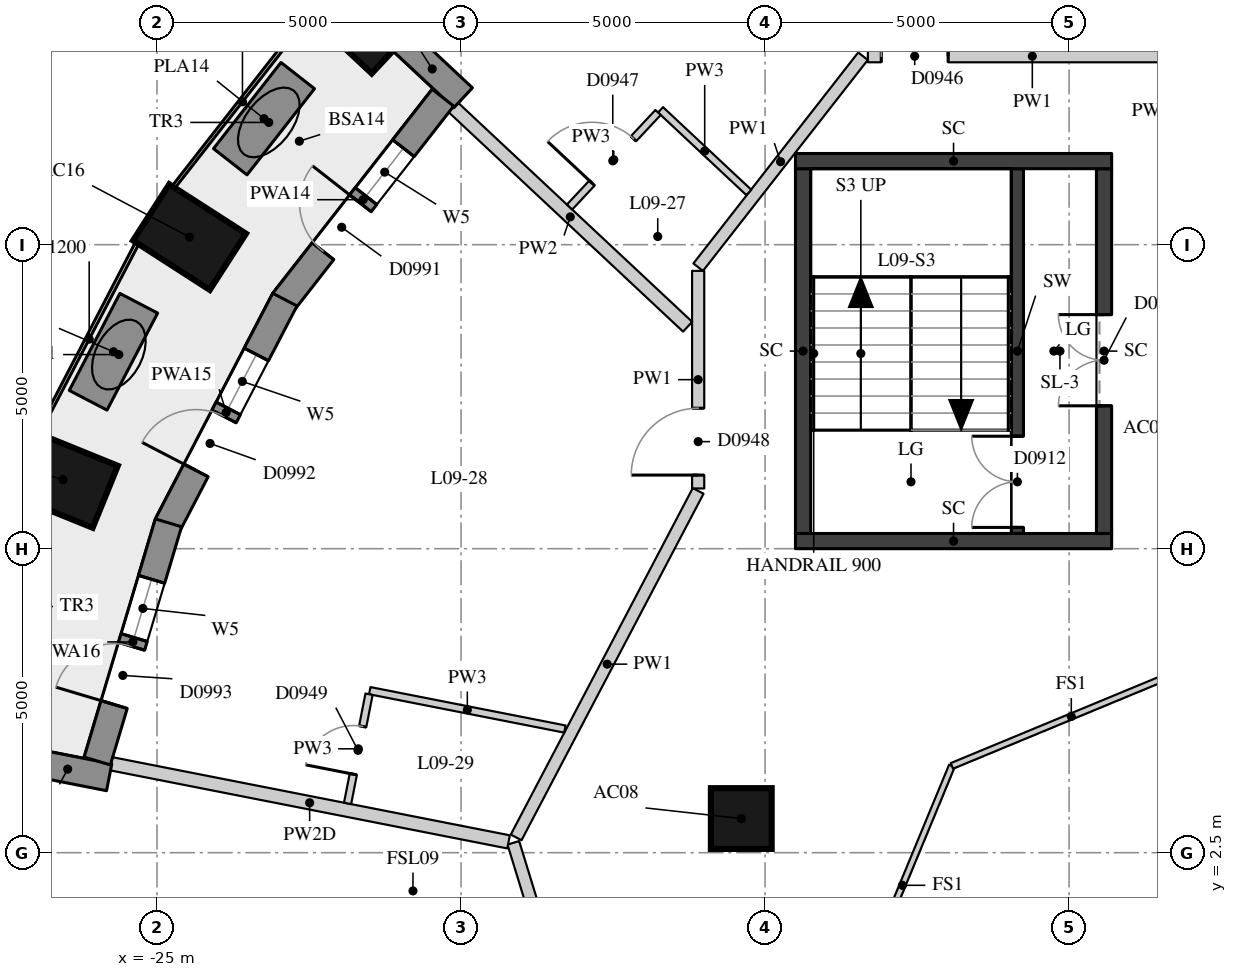
"""IFC4 building model, lengths in metres.
Left out: names, types, materials, properties, quantities, classifications, styles, units other than length and angle.
Written with IfcOpenShell. Run it as: python <this file> out.ifc"""

import sys

from ifc_helpers import new_model, si_unit, direction, frame, frame_2d, origin, origin_2d, place, context, subcontext, project, spatial, rectangle, extrude, element, fill, save


model = new_model("IFC4")
c1 = context("Model", 3, precision=1e-05, world=origin(), true_north=direction((0.0, 1.0)))
c2 = subcontext(c1, "Body", "Model", "MODEL_VIEW")
j1 = project(units=[si_unit("LENGTHUNIT", "METRE"), si_unit("PLANEANGLEUNIT", "RADIAN")], contexts=[c1])
p1 = place(None, origin())
s1 = spatial("IfcSite", under=j1, at=p1, CompositionType="ELEMENT")
p2 = place(p1, origin())
s2 = spatial("IfcBuilding", under=s1, at=p2, CompositionType="ELEMENT")
p3 = place(p2, frame((0.0, 0.0, 38.2)))
s3 = spatial("IfcBuildingStorey", under=s2, at=p3, CompositionType="ELEMENT", Elevation=38.2)
for number, where, z_axis, x_axis in (
    (1, (-21.641, 16.23, 0.0), (0.0, 0.0, 1.0), (-0.73, 0.683, 0.0)),
    (2, (-24.465, 12.625, 0.0), (0.0, 0.0, 1.0), (-0.841, 0.541, 0.0)),
    (3, (-26.546, 8.636, 0.0), (0.0, 0.0, 1.0), (-0.927, 0.376, 0.0)),
):
    element("IfcColumn", number, at=place(p3, frame(where, z_axis=z_axis, x_axis=x_axis)), inside=s3, PredefinedType="COLUMN", context=c2, shape_type="SweptSolid", body=[
        extrude(rectangle(XDim=1.5, YDim=1.1, at=origin_2d()), origin(), (0.0, 0.0, 1.0), 3.3),
    ])
p4 = place(p3, frame((-15.391, 3.062, 0.0), z_axis=(0.0, 0.0, 1.0), x_axis=(1.0, 0.0, 0.0)))
e4 = element("IfcColumn", 4, at=p4, inside=s3, PredefinedType="COLUMN", context=c2, shape_type="SweptSolid", body=[
    extrude(rectangle(XDim=1.0, YDim=1.0, at=origin_2d()), origin(), (0.0, 0.0, 1.0), 3.3),
])
p5 = place(p3, frame((-20.982, 15.866, 0.0), z_axis=(0.0, 0.0, 1.0), x_axis=(0.730062381614, -0.683380508174, 0.0)))
e5 = element("IfcWall", 5, at=p5, inside=s3, PredefinedType="SOLIDWALL", context=c2, shape_type="SweptSolid", body=[
    extrude(rectangle(XDim=1.391, YDim=0.45, at=frame_2d((0.696, 0.0))), origin(), (0.0, 0.0, 1.0), 3.02),
])
p6 = place(p3, frame((-27.151, 4.009, 0.0), z_axis=(0.0, 0.0, 1.0), x_axis=(0.981197182729, -0.1930080014, 0.0)))
e6 = element("IfcWall", 6, at=p6, inside=s3, PredefinedType="SOLIDWALL", context=c2, shape_type="SweptSolid", body=[
    extrude(rectangle(XDim=1.39, YDim=0.45, at=frame_2d((0.695, 0.0))), origin(), (0.0, 0.0, 1.0), 2.47),
])
p7 = place(p3, frame((-20.298, 14.918, 0.0), z_axis=(0.0, 0.0, 1.0), x_axis=(-0.615578403957, -0.788075649022, 0.0)))
e7 = element("IfcWall", 7, at=p7, inside=s3, PredefinedType="SOLIDWALL", context=c2, shape_type="SweptSolid", body=[
    extrude(rectangle(XDim=4.259, YDim=0.45, at=frame_2d((2.129, 0.0))), origin(), (0.0, 0.0, 1.0), 3.02),
])
p8 = place(p7, frame((1.054, 0.0, 0.4)))
e8 = element("IfcOpeningElement", 8, at=p8, cuts=e7, PredefinedType="OPENING", context=c2, shape_type="SweptSolid", body=[
    extrude(rectangle(XDim=1.0, YDim=1.75, at=frame_2d((0.5, 0.875))), frame((0.0, 0.235, 0.0), z_axis=(0.0, -1.0, 0.0), x_axis=(1.0, 0.0, 0.0)), (0.0, 0.0, 1.0), 0.47),
])
p9 = place(p7, frame((2.204, 0.0, 0.0)))
e9 = element("IfcOpeningElement", 9, at=p9, cuts=e7, PredefinedType="OPENING", context=c2, shape_type="SweptSolid", body=[
    extrude(rectangle(XDim=1.0, YDim=2.15, at=frame_2d((0.5, 1.075))), frame((0.0, 0.235, 0.0), z_axis=(0.0, -1.0, 0.0), x_axis=(1.0, 0.0, 0.0)), (0.0, 0.0, 1.0), 0.47),
])
p10 = place(p3, frame((-22.897, 11.597, 0.0), z_axis=(0.0, 0.0, 1.0), x_axis=(-0.461514453451, -0.887132689769, 0.0)))
e10 = element("IfcWall", 10, at=p10, inside=s3, PredefinedType="SOLIDWALL", context=c2, shape_type="SweptSolid", body=[
    extrude(rectangle(XDim=4.183, YDim=0.45, at=frame_2d((2.091, 0.0))), origin(), (0.0, 0.0, 1.0), 3.02),
])
p11 = place(p10, frame((1.016, 0.0, 0.4)))
e11 = element("IfcOpeningElement", 11, at=p11, cuts=e10, PredefinedType="OPENING", context=c2, shape_type="SweptSolid", body=[
    extrude(rectangle(XDim=1.0, YDim=1.75, at=frame_2d((0.5, 0.875))), frame((0.0, 0.235, 0.0), z_axis=(0.0, -1.0, 0.0), x_axis=(1.0, 0.0, 0.0)), (0.0, 0.0, 1.0), 0.47),
])
p12 = place(p10, frame((2.167, 0.0, 0.0)))
e12 = element("IfcOpeningElement", 12, at=p12, cuts=e10, PredefinedType="OPENING", context=c2, shape_type="SweptSolid", body=[
    extrude(rectangle(XDim=1.0, YDim=2.15, at=frame_2d((0.5, 1.075))), frame((0.0, 0.235, 0.0), z_axis=(0.0, -1.0, 0.0), x_axis=(1.0, 0.0, 0.0)), (0.0, 0.0, 1.0), 0.47),
])
p13 = place(p3, frame((-24.812, 7.925, 0.0), z_axis=(0.0, 0.0, 1.0), x_axis=(-0.286389028326, -0.95811341941, 0.0)))
e13 = element("IfcWall", 13, at=p13, inside=s3, PredefinedType="SOLIDWALL", context=c2, shape_type="SweptSolid", body=[
    extrude(rectangle(XDim=4.088, YDim=0.45, at=frame_2d((2.044, 0.0))), origin(), (0.0, 0.0, 1.0), 3.02),
])
p14 = place(p13, frame((0.969, 0.0, 0.4)))
e14 = element("IfcOpeningElement", 14, at=p14, cuts=e13, PredefinedType="OPENING", context=c2, shape_type="SweptSolid", body=[
    extrude(rectangle(XDim=1.0, YDim=1.75, at=frame_2d((0.5, 0.875))), frame((0.0, 0.235, 0.0), z_axis=(0.0, -1.0, 0.0), x_axis=(1.0, 0.0, 0.0)), (0.0, 0.0, 1.0), 0.47),
])
p15 = place(p13, frame((2.119, 0.0, 0.0)))
e15 = element("IfcOpeningElement", 15, at=p15, cuts=e13, PredefinedType="OPENING", context=c2, shape_type="SweptSolid", body=[
    extrude(rectangle(XDim=1.0, YDim=2.15, at=frame_2d((0.5, 1.075))), frame((0.0, 0.235, 0.0), z_axis=(0.0, -1.0, 0.0), x_axis=(1.0, 0.0, 0.0)), (0.0, 0.0, 1.0), 0.47),
])
p16 = place(p3, frame((-22.686, 15.281, 0.0), z_axis=(0.0, 0.0, 1.0), x_axis=(-0.616622746332, -0.787258781282, 0.0)))
e16 = element("IfcWall", 16, at=p16, inside=s3, PredefinedType="USERDEFINED", context=c2, shape_type="SweptSolid", body=[
    extrude(rectangle(XDim=1.8, YDim=0.7, at=frame_2d((0.9, 0.0))), origin(), (0.0, 0.0, 1.0), 0.75),
])
p17 = place(p3, frame((-25.3, 11.537, 0.0), z_axis=(0.0, 0.0, 1.0), x_axis=(-0.462501112253, -0.886618701114, 0.0)))
e17 = element("IfcWall", 17, at=p17, inside=s3, PredefinedType="USERDEFINED", context=c2, shape_type="SweptSolid", body=[
    extrude(rectangle(XDim=1.8, YDim=0.7, at=frame_2d((0.9, 0.0))), origin(), (0.0, 0.0, 1.0), 0.75),
])
p18 = place(p3, frame((-10.85, 7.75, 0.0), z_axis=(0.0, 0.0, 1.0), x_axis=(0.0, 1.0, 0.0)))
e18 = element("IfcWall", 18, at=p18, inside=s3, PredefinedType="SHEAR", context=c2, shape_type="SweptSolid", body=[
    extrude(rectangle(XDim=6.0, YDim=0.2, at=frame_2d((3.0, 0.0))), origin(), (0.0, 0.0, 1.0), 3.02),
])
p19 = place(p18, frame((0.1, 0.0, 0.0)))
e19 = element("IfcOpeningElement", 19, at=p19, cuts=e18, PredefinedType="OPENING", context=c2, shape_type="SweptSolid", body=[
    extrude(rectangle(XDim=1.5, YDim=2.1, at=frame_2d((0.75, 1.05))), frame((0.0, 0.11, 0.0), z_axis=(0.0, -1.0, 0.0), x_axis=(1.0, 0.0, 0.0)), (0.0, 0.0, 1.0), 0.22),
])
p20 = place(p3, frame((-14.375, 7.75, -0.28), z_axis=(0.0, 0.0, 1.0), x_axis=(0.0, 1.0, 0.0)))
e20 = element("IfcWall", 20, at=p20, inside=s3, PredefinedType="SHEAR", context=c2, shape_type="SweptSolid", body=[
    extrude(rectangle(XDim=6.0, YDim=0.25, at=frame_2d((3.0, 0.0))), origin(), (0.0, 0.0, 1.0), 3.3),
])
p21 = place(p3, frame((-9.425, 7.75, -0.28), z_axis=(0.0, 0.0, 1.0), x_axis=(0.0, 1.0, 0.0)))
e21 = element("IfcWall", 21, at=p21, inside=s3, PredefinedType="SHEAR", context=c2, shape_type="SweptSolid", body=[
    extrude(rectangle(XDim=6.0, YDim=0.25, at=frame_2d((3.0, 0.0))), origin(), (0.0, 0.0, 1.0), 3.3),
])
p22 = place(p21, frame((2.1, 0.0, 0.28)))
e22 = element("IfcOpeningElement", 22, at=p22, cuts=e21, PredefinedType="OPENING", context=c2, shape_type="SweptSolid", body=[
    extrude(rectangle(XDim=1.5, YDim=2.1, at=frame_2d((0.75, 1.05))), frame((0.0, 0.135, 0.0), z_axis=(0.0, -1.0, 0.0), x_axis=(1.0, 0.0, 0.0)), (0.0, 0.0, 1.0), 0.27),
])
for number, where, z_axis, x_axis in (
    (23, (-14.5, 13.875, -0.28), (0.0, 0.0, 1.0), (1.0, 0.0, 0.0)),
    (24, (-14.5, 7.625, -0.28), (0.0, 0.0, 1.0), (1.0, 0.0, 0.0)),
):
    element("IfcWall", number, at=place(p3, frame(where, z_axis=z_axis, x_axis=x_axis)), inside=s3, PredefinedType="SHEAR", context=c2, shape_type="SweptSolid", body=[
        extrude(rectangle(XDim=5.2, YDim=0.25, at=frame_2d((2.6, 0.0))), origin(), (0.0, 0.0, 1.0), 3.3),
    ])
p23 = place(p3, frame((-16.1, 12.13, 0.0), z_axis=(0.0, 0.0, 1.0), x_axis=(0.615593476668, 0.788063875256, 0.0)))
e25 = element("IfcWall", 25, at=p23, inside=s3, PredefinedType="PARTITIONING", context=c2, shape_type="SweptSolid", body=[
    extrude(rectangle(XDim=4.404, YDim=0.2, at=frame_2d((2.202, 0.0))), origin(), (0.0, 0.0, 1.0), 3.02),
])
p24 = place(p3, frame((-13.309, 15.6, 0.0), z_axis=(0.0, 0.0, 1.0), x_axis=(1.0, 0.0, 0.0)))
e26 = element("IfcWall", 26, at=p24, inside=s3, PredefinedType="PARTITIONING", context=c2, shape_type="SweptSolid", body=[
    extrude(rectangle(XDim=5.409, YDim=0.2, at=frame_2d((2.705, 0.0))), origin(), (0.0, 0.0, 1.0), 3.02),
])
p25 = place(p24, frame((0.22, 0.0, 0.0)))
e27 = element("IfcOpeningElement", 27, at=p25, cuts=e26, PredefinedType="OPENING", context=c2, shape_type="SweptSolid", body=[
    extrude(rectangle(XDim=1.1, YDim=2.1, at=frame_2d((0.55, 1.05))), frame((0.0, 0.11, 0.0), z_axis=(0.0, -1.0, 0.0), x_axis=(1.0, 0.0, 0.0)), (0.0, 0.0, 1.0), 0.22),
])
p26 = place(p3, frame((-16.112, -7.203, 0.0), z_axis=(0.0, 0.0, 1.0), x_axis=(-0.293439067289, 0.95597777892, 0.0)))
e28 = element("IfcWall", 28, at=p26, inside=s3, PredefinedType="PARTITIONING", context=c2, shape_type="SweptSolid", body=[
    extrude(rectangle(XDim=10.319, YDim=0.2, at=frame_2d((5.16, 0.0))), origin(), (0.0, 0.0, 1.0), 3.02),
])
p27 = place(p26, frame((7.444, 0.0, 0.0)))
e29 = element("IfcOpeningElement", 29, at=p27, cuts=e28, PredefinedType="OPENING", context=c2, shape_type="SweptSolid", body=[
    extrude(rectangle(XDim=1.1, YDim=2.1, at=frame_2d((0.55, 1.05))), frame((0.0, 0.11, 0.0), z_axis=(0.0, -1.0, 0.0), x_axis=(1.0, 0.0, 0.0)), (0.0, 0.0, 1.0), 0.22),
])
p28 = place(p26, frame((2.081, 0.0, 0.0)))
e30 = element("IfcOpeningElement", 30, at=p28, cuts=e28, PredefinedType="OPENING", context=c2, shape_type="SweptSolid", body=[
    extrude(rectangle(XDim=0.9, YDim=2.1, at=frame_2d((0.45, 1.05))), frame((0.0, 0.11, 0.0), z_axis=(0.0, -1.0, 0.0), x_axis=(1.0, 0.0, 0.0)), (0.0, 0.0, 1.0), 0.22),
])
p29 = place(p3, frame((-19.094, 2.751, 0.0), z_axis=(0.0, 0.0, 1.0), x_axis=(0.464994434802, 0.88531360297, 0.0)))
e31 = element("IfcWall", 31, at=p29, inside=s3, PredefinedType="PARTITIONING", context=c2, shape_type="SweptSolid", body=[
    extrude(rectangle(XDim=6.438, YDim=0.2, at=frame_2d((3.219, 0.0))), origin(), (0.0, 0.0, 1.0), 3.02),
])
p30 = place(p3, frame((-16.1, 8.491, 0.0), z_axis=(0.0, 0.0, 1.0), x_axis=(0.0, 1.0, 0.0)))
e32 = element("IfcWall", 32, at=p30, inside=s3, PredefinedType="PARTITIONING", context=c2, shape_type="SweptSolid", body=[
    extrude(rectangle(XDim=3.579, YDim=0.2, at=frame_2d((1.79, 0.0))), origin(), (0.0, 0.0, 1.0), 3.02),
])
p31 = place(p30, frame((0.22, 0.0, 0.0)))
e33 = element("IfcOpeningElement", 33, at=p31, cuts=e32, PredefinedType="OPENING", context=c2, shape_type="SweptSolid", body=[
    extrude(rectangle(XDim=1.1, YDim=2.1, at=frame_2d((0.55, 1.05))), frame((0.0, 0.11, 0.0), z_axis=(0.0, -1.0, 0.0), x_axis=(1.0, 0.0, 0.0)), (0.0, 0.0, 1.0), 0.22),
])
p32 = place(p3, frame((-20.133, 14.764, 0.0), z_axis=(0.0, 0.0, 1.0), x_axis=(0.730065516357, -0.68337715928, 0.0)))
e34 = element("IfcWall", 34, at=p32, inside=s3, PredefinedType="PARTITIONING", context=c2, shape_type="SweptSolid", body=[
    extrude(rectangle(XDim=5.287, YDim=0.22, at=frame_2d((2.643, 0.0))), origin(), (0.0, 0.0, 1.0), 3.02),
])
p33 = place(p3, frame((-25.761, 3.964, 0.0), z_axis=(0.0, 0.0, 1.0), x_axis=(0.981216162043, -0.192911490963, 0.0)))
e35 = element("IfcWall", 35, at=p33, inside=s3, PredefinedType="PARTITIONING", context=c2, shape_type="SweptSolid", body=[
    extrude(rectangle(XDim=6.668, YDim=0.22, at=frame_2d((3.334, 0.0))), origin(), (0.0, 0.0, 1.0), 2.47),
])
p34 = place(p3, frame((-15.267, 13.359, 0.0), z_axis=(0.0, 0.0, 1.0), x_axis=(-0.730103481834, 0.683336597742, 0.0)))
e36 = element("IfcWall", 36, at=p34, inside=s3, PredefinedType="PARTITIONING", context=c2, shape_type="SweptSolid", body=[
    extrude(rectangle(XDim=1.989, YDim=0.12, at=frame_2d((0.995, 0.0))), origin(), (0.0, 0.0, 1.0), 3.02),
])
p35 = place(p3, frame((-18.292, 4.534, 0.0), z_axis=(0.0, 0.0, 1.0), x_axis=(-0.981198627208, 0.193000657942, 0.0)))
e37 = element("IfcWall", 37, at=p35, inside=s3, PredefinedType="PARTITIONING", context=c2, shape_type="SweptSolid", body=[
    extrude(rectangle(XDim=3.271, YDim=0.12, at=frame_2d((1.636, 0.0))), origin(), (0.0, 0.0, 1.0), 3.02),
])
p36 = place(p3, frame((-16.76, 14.674, 0.0), z_axis=(0.0, 0.0, 1.0), x_axis=(-0.683334594436, -0.730105356813, 0.0)))
e38 = element("IfcWall", 38, at=p36, inside=s3, PredefinedType="PARTITIONING", context=c2, shape_type="SweptSolid", body=[
    extrude(rectangle(XDim=2.13, YDim=0.12, at=frame_2d((1.065, 0.0))), origin(), (0.0, 0.0, 1.0), 3.02),
])
p37 = place(p36, frame((0.59, 0.0, 0.0)))
e39 = element("IfcOpeningElement", 39, at=p37, cuts=e38, PredefinedType="OPENING", context=c2, shape_type="SweptSolid", body=[
    extrude(rectangle(XDim=1.0, YDim=2.1, at=frame_2d((0.5, 1.05))), frame((0.0, 0.07, 0.0), z_axis=(0.0, -1.0, 0.0), x_axis=(1.0, 0.0, 0.0)), (0.0, 0.0, 1.0), 0.14),
])
p38 = place(p3, frame((-21.513, 5.106, 0.0), z_axis=(0.0, 0.0, 1.0), x_axis=(-0.19288291118, -0.981221780524, 0.0)))
e40 = element("IfcWall", 40, at=p38, inside=s3, PredefinedType="PARTITIONING", context=c2, shape_type="SweptSolid", body=[
    extrude(rectangle(XDim=1.83, YDim=0.12, at=frame_2d((0.915, 0.0))), origin(), (0.0, 0.0, 1.0), 3.02),
])
p39 = place(p38, frame((0.54, 0.0, 0.0)))
e41 = element("IfcOpeningElement", 41, at=p39, cuts=e40, PredefinedType="OPENING", context=c2, shape_type="SweptSolid", body=[
    extrude(rectangle(XDim=0.8, YDim=2.1, at=frame_2d((0.4, 1.05))), frame((0.0, 0.07, 0.0), z_axis=(0.0, -1.0, 0.0), x_axis=(1.0, 0.0, 0.0)), (0.0, 0.0, 1.0), 0.14),
])
for number, where, z_axis, x_axis in (
    (42, (-13.554, 0.0, 0.0), (0.0, 0.0, 1.0), (0.383, 0.924, 0.0)),
    (43, (-11.927, 3.927, 0.0), (0.0, 0.0, 1.0), (0.924, 0.383, 0.0)),
):
    element("IfcWall", number, at=place(p3, frame(where, z_axis=z_axis, x_axis=x_axis)), inside=s3, PredefinedType="PARTITIONING", context=c2, shape_type="SweptSolid", body=[
        extrude(rectangle(XDim=4.251, YDim=0.1, at=frame_2d((2.125, 0.0))), origin(), (0.0, 0.0, 1.0), 3.02),
    ])
p40 = place(p8, origin())
e44 = element("IfcWindow", 44, at=p40, inside=s3, PartitioningType="SINGLE_PANEL", PredefinedType="WINDOW", context=c2, shape_type="SweptSolid", body=[
    extrude(rectangle(XDim=1.0, YDim=1.75, at=frame_2d((0.5, 0.875))), frame((0.0, 0.035, 0.0), z_axis=(0.0, -1.0, 0.0), x_axis=(1.0, 0.0, 0.0)), (0.0, 0.0, 1.0), 0.06),
])
fill(e8, e44)
p41 = place(p9, frame((1.0, 0.0, 0.0), z_axis=(0.0, 0.0, 1.0), x_axis=(-1.0, 0.0, 0.0)))
e45 = element("IfcDoor", 45, at=p41, inside=s3, OperationType="SINGLE_SWING_RIGHT", PredefinedType="DOOR", context=c2, shape_type="SweptSolid", body=[
    extrude(rectangle(XDim=1.0, YDim=2.15, at=frame_2d((0.5, 1.075))), frame((0.0, 0.075, 0.0), z_axis=(0.0, -1.0, 0.0), x_axis=(1.0, 0.0, 0.0)), (0.0, 0.0, 1.0), 0.05),
])
fill(e9, e45)
p42 = place(p11, origin())
e46 = element("IfcWindow", 46, at=p42, inside=s3, PartitioningType="SINGLE_PANEL", PredefinedType="WINDOW", context=c2, shape_type="SweptSolid", body=[
    extrude(rectangle(XDim=1.0, YDim=1.75, at=frame_2d((0.5, 0.875))), frame((0.0, 0.035, 0.0), z_axis=(0.0, -1.0, 0.0), x_axis=(1.0, 0.0, 0.0)), (0.0, 0.0, 1.0), 0.06),
])
fill(e11, e46)
p43 = place(p12, frame((1.0, 0.0, 0.0), z_axis=(0.0, 0.0, 1.0), x_axis=(-1.0, 0.0, 0.0)))
e47 = element("IfcDoor", 47, at=p43, inside=s3, OperationType="SINGLE_SWING_LEFT", PredefinedType="DOOR", context=c2, shape_type="SweptSolid", body=[
    extrude(rectangle(XDim=1.0, YDim=2.15, at=frame_2d((0.5, 1.075))), frame((0.0, 0.075, 0.0), z_axis=(0.0, -1.0, 0.0), x_axis=(1.0, 0.0, 0.0)), (0.0, 0.0, 1.0), 0.05),
])
fill(e12, e47)
p44 = place(p14, origin())
e48 = element("IfcWindow", 48, at=p44, inside=s3, PartitioningType="SINGLE_PANEL", PredefinedType="WINDOW", context=c2, shape_type="SweptSolid", body=[
    extrude(rectangle(XDim=1.0, YDim=1.75, at=frame_2d((0.5, 0.875))), frame((0.0, 0.035, 0.0), z_axis=(0.0, -1.0, 0.0), x_axis=(1.0, 0.0, 0.0)), (0.0, 0.0, 1.0), 0.06),
])
fill(e14, e48)
p45 = place(p15, frame((1.0, 0.0, 0.0), z_axis=(0.0, 0.0, 1.0), x_axis=(-1.0, 0.0, 0.0)))
e49 = element("IfcDoor", 49, at=p45, inside=s3, OperationType="SINGLE_SWING_LEFT", PredefinedType="DOOR", context=c2, shape_type="SweptSolid", body=[
    extrude(rectangle(XDim=1.0, YDim=2.15, at=frame_2d((0.5, 1.075))), frame((0.0, 0.075, 0.0), z_axis=(0.0, -1.0, 0.0), x_axis=(1.0, 0.0, 0.0)), (0.0, 0.0, 1.0), 0.05),
])
fill(e15, e49)
p46 = place(p19, origin())
e50 = element("IfcDoor", 50, at=p46, inside=s3, OperationType="DOUBLE_DOOR_SINGLE_SWING", PredefinedType="DOOR", context=c2, shape_type="SweptSolid", body=[
    extrude(rectangle(XDim=1.5, YDim=2.1, at=frame_2d((0.75, 1.05))), frame((0.0, 0.025, 0.0), z_axis=(0.0, -1.0, 0.0), x_axis=(1.0, 0.0, 0.0)), (0.0, 0.0, 1.0), 0.05),
])
fill(e19, e50)
p47 = place(p22, origin())
e51 = element("IfcDoor", 51, at=p47, inside=s3, OperationType="DOUBLE_DOOR_SINGLE_SWING", PredefinedType="DOOR", context=c2, shape_type="SweptSolid", body=[
    extrude(rectangle(XDim=1.5, YDim=2.1, at=frame_2d((0.75, 1.05))), frame((0.0, 0.025, 0.0), z_axis=(0.0, -1.0, 0.0), x_axis=(1.0, 0.0, 0.0)), (0.0, 0.0, 1.0), 0.05),
])
fill(e22, e51)
p48 = place(p25, origin())
e52 = element("IfcDoor", 52, at=p48, inside=s3, OperationType="SINGLE_SWING_RIGHT", PredefinedType="DOOR", context=c2, shape_type="SweptSolid", body=[
    extrude(rectangle(XDim=1.1, YDim=2.1, at=frame_2d((0.55, 1.05))), frame((0.0, 0.025, 0.0), z_axis=(0.0, -1.0, 0.0), x_axis=(1.0, 0.0, 0.0)), (0.0, 0.0, 1.0), 0.05),
])
fill(e27, e52)
p49 = place(p37, origin())
e53 = element("IfcDoor", 53, at=p49, inside=s3, OperationType="SINGLE_SWING_LEFT", PredefinedType="DOOR", context=c2, shape_type="SweptSolid", body=[
    extrude(rectangle(XDim=1.0, YDim=2.1, at=frame_2d((0.5, 1.05))), frame((0.0, 0.025, 0.0), z_axis=(0.0, -1.0, 0.0), x_axis=(1.0, 0.0, 0.0)), (0.0, 0.0, 1.0), 0.05),
])
fill(e39, e53)
p50 = place(p31, origin())
e54 = element("IfcDoor", 54, at=p50, inside=s3, OperationType="SINGLE_SWING_LEFT", PredefinedType="DOOR", context=c2, shape_type="SweptSolid", body=[
    extrude(rectangle(XDim=1.1, YDim=2.1, at=frame_2d((0.55, 1.05))), frame((0.0, 0.025, 0.0), z_axis=(0.0, -1.0, 0.0), x_axis=(1.0, 0.0, 0.0)), (0.0, 0.0, 1.0), 0.05),
])
fill(e33, e54)
p51 = place(p39, origin())
e55 = element("IfcDoor", 55, at=p51, inside=s3, OperationType="SINGLE_SWING_LEFT", PredefinedType="DOOR", context=c2, shape_type="SweptSolid", body=[
    extrude(rectangle(XDim=0.8, YDim=2.1, at=frame_2d((0.4, 1.05))), frame((0.0, 0.025, 0.0), z_axis=(0.0, -1.0, 0.0), x_axis=(1.0, 0.0, 0.0)), (0.0, 0.0, 1.0), 0.05),
])
fill(e41, e55)
save(model, sys.argv[1])
